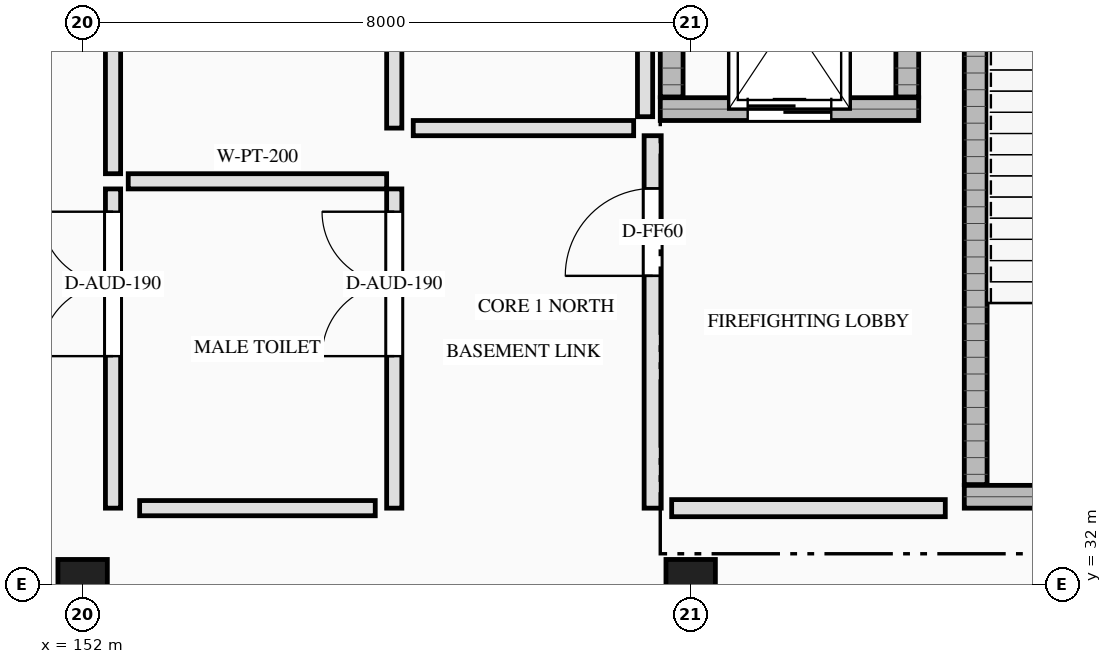
"""IFC4 building model, lengths in metres.
Left out: names, types, materials, properties, quantities, classifications, styles, units other than length and angle.
Written with IfcOpenShell. Run it as: python <this file> out.ifc"""

import sys

from ifc_helpers import new_model, si_unit, direction, frame, frame_2d, origin, origin_2d, place, context, subcontext, project, spatial, rectangle, extrude, element, fill, save


model = new_model("IFC4")
c1 = context("Model", 3, precision=1e-05, world=origin(), true_north=direction((0.0, 1.0)))
c2 = subcontext(c1, "Body", "Model", "MODEL_VIEW")
j1 = project(units=[si_unit("LENGTHUNIT", "METRE"), si_unit("PLANEANGLEUNIT", "RADIAN")], contexts=[c1])
p1 = place(None, origin())
s1 = spatial("IfcSite", under=j1, at=p1, CompositionType="ELEMENT")
p2 = place(p1, origin())
s2 = spatial("IfcBuilding", under=s1, at=p2, CompositionType="ELEMENT")
p3 = place(p2, frame((0.0, 0.0, -5.4)))
s3 = spatial("IfcBuildingStorey", under=s2, at=p3, CompositionType="ELEMENT", Elevation=-5.4)
p4 = place(p3, frame((163.6, 33.15, -0.4), z_axis=(0.0, 0.0, 1.0), x_axis=(1.0, 0.0, 0.0)))
e1 = element("IfcWall", 1, at=p4, inside=s3, PredefinedType="SHEAR", context=c2, shape_type="SweptSolid", body=[
    extrude(rectangle(XDim=4.4, YDim=0.3, at=frame_2d((2.2, 0.0))), origin(), (0.0, 0.0, 1.0), 5.8),
])
p5 = place(p4, frame((1.3, 0.0, 0.4)))
e2 = element("IfcOpeningElement", 2, at=p5, cuts=e1, PredefinedType="OPENING", context=c2, shape_type="SweptSolid", body=[
    extrude(rectangle(XDim=1.8, YDim=2.2, at=frame_2d((0.9, 1.1))), frame((0.0, 0.16, 0.0), z_axis=(0.0, -1.0, 0.0), x_axis=(1.0, 0.0, 0.0)), (0.0, 0.0, 1.0), 0.32),
])
p6 = place(p3, frame((163.75, 33.31, -0.4), z_axis=(0.0, 0.0, 1.0), x_axis=(0.0, 1.0, 0.0)))
e3 = element("IfcWall", 3, at=p6, inside=s3, PredefinedType="SHEAR", context=c2, shape_type="SweptSolid", body=[
    extrude(rectangle(XDim=9.38, YDim=0.3, at=frame_2d((4.69, 0.0))), origin(), (0.0, 0.0, 1.0), 5.8),
])
p7 = place(p3, frame((159.6, 38.25, -0.4), z_axis=(0.0, 0.0, 1.0), x_axis=(1.0, 0.0, 0.0)))
e4 = element("IfcWall", 4, at=p7, inside=s3, PredefinedType="SHEAR", context=c2, shape_type="SweptSolid", body=[
    extrude(rectangle(XDim=3.4, YDim=0.3, at=frame_2d((1.7, 0.0))), origin(), (0.0, 0.0, 1.0), 5.8),
])
p8 = place(p7, frame((1.15, 0.0, 0.4)))
e5 = element("IfcOpeningElement", 5, at=p8, cuts=e4, PredefinedType="OPENING", context=c2, shape_type="SweptSolid", body=[
    extrude(rectangle(XDim=1.1, YDim=2.15, at=frame_2d((0.55, 1.075))), frame((0.0, 0.16, 0.0), z_axis=(0.0, -1.0, 0.0), x_axis=(1.0, 0.0, 0.0)), (0.0, 0.0, 1.0), 0.32),
])
for number, where, z_axis, x_axis in (
    (6, (159.75, 38.41, -0.4), (0.0, 0.0, 1.0), (0.0, 1.0, 0.0)),
    (7, (162.85, 38.41, -0.4), (0.0, 0.0, 1.0), (0.0, 1.0, 0.0)),
):
    element("IfcWall", number, at=place(p3, frame(where, z_axis=z_axis, x_axis=x_axis)), inside=s3, PredefinedType="SHEAR", context=c2, shape_type="SweptSolid", body=[
        extrude(rectangle(XDim=2.08, YDim=0.3, at=frame_2d((1.04, 0.0))), origin(), (0.0, 0.0, 1.0), 5.8),
    ])
for number, where, z_axis, x_axis in (
    (8, (152.0, 32.0, -0.4), (0.0, 0.0, 1.0), (1.0, 0.0, 0.0)),
    (9, (160.0, 32.0, -0.4), (0.0, 0.0, 1.0), (1.0, 0.0, 0.0)),
):
    element("IfcColumn", number, at=place(p3, frame(where, z_axis=z_axis, x_axis=x_axis)), inside=s3, PredefinedType="COLUMN", context=c2, shape_type="SweptSolid", body=[
        extrude(rectangle(XDim=0.65, YDim=0.65, at=origin_2d()), origin(), (0.0, 0.0, 1.0), 5.8),
    ])
p9 = place(p3, frame((159.5, 33.0, 0.0), z_axis=(0.0, 0.0, 1.0), x_axis=(0.0, 1.0, 0.0)))
e10 = element("IfcWall", 10, at=p9, inside=s3, PredefinedType="SOLIDWALL", context=c2, shape_type="SweptSolid", body=[
    extrude(rectangle(XDim=4.9, YDim=0.225, at=frame_2d((2.45, 0.0))), origin(), (0.0, 0.0, 1.0), 5.12),
])
p10 = place(p9, frame((3.056, 0.0, 0.0)))
e11 = element("IfcOpeningElement", 11, at=p10, cuts=e10, PredefinedType="OPENING", context=c2, shape_type="SweptSolid", body=[
    extrude(rectangle(XDim=1.15, YDim=2.2, at=frame_2d((0.575, 1.1))), frame((0.0, 0.123, 0.0), z_axis=(0.0, -1.0, 0.0), x_axis=(1.0, 0.0, 0.0)), (0.0, 0.0, 1.0), 0.245),
])
p11 = place(p3, frame((152.6, 37.3, 0.0), z_axis=(0.0, 0.0, 1.0), x_axis=(1.0, 0.0, 0.0)))
e12 = element("IfcWall", 12, at=p11, inside=s3, PredefinedType="PARTITIONING", context=c2, shape_type="SweptSolid", body=[
    extrude(rectangle(XDim=3.4, YDim=0.2, at=frame_2d((1.7, 0.0))), origin(), (0.0, 0.0, 1.0), 5.12),
])
p12 = place(p3, frame((152.4, 33.0, 0.0), z_axis=(0.0, 0.0, 1.0), x_axis=(0.0, 1.0, 0.0)))
e13 = element("IfcWall", 13, at=p12, inside=s3, PredefinedType="PARTITIONING", context=c2, shape_type="SweptSolid", body=[
    extrude(rectangle(XDim=4.2, YDim=0.2, at=frame_2d((2.1, 0.0))), origin(), (0.0, 0.0, 1.0), 5.12),
])
p13 = place(p12, frame((2.0, 0.0, 0.0)))
e14 = element("IfcOpeningElement", 14, at=p13, cuts=e13, PredefinedType="OPENING", context=c2, shape_type="SweptSolid", body=[
    extrude(rectangle(XDim=1.9, YDim=2.35, at=frame_2d((0.95, 1.175))), frame((0.0, 0.11, 0.0), z_axis=(0.0, -1.0, 0.0), x_axis=(1.0, 0.0, 0.0)), (0.0, 0.0, 1.0), 0.22),
])
p14 = place(p3, frame((156.1, 33.0, 0.0), z_axis=(0.0, 0.0, 1.0), x_axis=(0.0, 1.0, 0.0)))
e15 = element("IfcWall", 15, at=p14, inside=s3, PredefinedType="PARTITIONING", context=c2, shape_type="SweptSolid", body=[
    extrude(rectangle(XDim=4.2, YDim=0.2, at=frame_2d((2.1, 0.0))), origin(), (0.0, 0.0, 1.0), 5.12),
])
p15 = place(p14, frame((2.0, 0.0, 0.0)))
e16 = element("IfcOpeningElement", 16, at=p15, cuts=e15, PredefinedType="OPENING", context=c2, shape_type="SweptSolid", body=[
    extrude(rectangle(XDim=1.9, YDim=2.35, at=frame_2d((0.95, 1.175))), frame((0.0, 0.11, 0.0), z_axis=(0.0, -1.0, 0.0), x_axis=(1.0, 0.0, 0.0)), (0.0, 0.0, 1.0), 0.22),
])
p16 = place(p3, frame((156.1, 38.0, 0.0), z_axis=(0.0, 0.0, 1.0), x_axis=(0.0, 1.0, 0.0)))
e17 = element("IfcWall", 17, at=p16, inside=s3, PredefinedType="PARTITIONING", context=c2, shape_type="SweptSolid", body=[
    extrude(rectangle(XDim=3.6, YDim=0.2, at=frame_2d((1.8, 0.0))), origin(), (0.0, 0.0, 1.0), 5.12),
])
p17 = place(p3, frame((152.4, 37.4, 0.0), z_axis=(0.0, 0.0, 1.0), x_axis=(0.0, 1.0, 0.0)))
e18 = element("IfcWall", 18, at=p17, inside=s3, PredefinedType="PARTITIONING", context=c2, shape_type="SweptSolid", body=[
    extrude(rectangle(XDim=4.2, YDim=0.2, at=frame_2d((2.1, 0.0))), origin(), (0.0, 0.0, 1.0), 5.12),
])
p18 = place(p3, frame((159.75, 33.0, 0.0), z_axis=(0.0, 0.0, 1.0), x_axis=(1.0, 0.0, 0.0)))
e19 = element("IfcWall", 19, at=p18, inside=s3, PredefinedType="SOLIDWALL", context=c2, shape_type="SweptSolid", body=[
    extrude(rectangle(XDim=3.6, YDim=0.225, at=frame_2d((1.8, 0.0))), origin(), (0.0, 0.0, 1.0), 5.12),
])
p19 = place(p3, frame((152.75, 33.0, 0.0), z_axis=(0.0, 0.0, 1.0), x_axis=(1.0, 0.0, 0.0)))
e20 = element("IfcWall", 20, at=p19, inside=s3, PredefinedType="PARTITIONING", context=c2, shape_type="SweptSolid", body=[
    extrude(rectangle(XDim=3.1, YDim=0.2, at=frame_2d((1.55, 0.0))), origin(), (0.0, 0.0, 1.0), 5.12),
])
p20 = place(p3, frame((156.35, 38.0, 0.0), z_axis=(0.0, 0.0, 1.0), x_axis=(1.0, 0.0, 0.0)))
e21 = element("IfcWall", 21, at=p20, inside=s3, PredefinedType="PARTITIONING", context=c2, shape_type="SweptSolid", body=[
    extrude(rectangle(XDim=2.9, YDim=0.2, at=frame_2d((1.45, 0.0))), origin(), (0.0, 0.0, 1.0), 5.12),
])
p21 = place(p3, frame((159.4, 38.15, 0.0), z_axis=(0.0, 0.0, 1.0), x_axis=(0.0, 1.0, 0.0)))
e22 = element("IfcWall", 22, at=p21, inside=s3, PredefinedType="PARTITIONING", context=c2, shape_type="SweptSolid", body=[
    extrude(rectangle(XDim=3.3, YDim=0.2, at=frame_2d((1.65, 0.0))), origin(), (0.0, 0.0, 1.0), 5.12),
])
p22 = place(p8, origin())
e23 = element("IfcDoor", 23, at=p22, inside=s3, OperationType="SLIDING_TO_LEFT", PredefinedType="DOOR", context=c2, shape_type="SweptSolid", body=[
    extrude(rectangle(XDim=1.1, YDim=2.15, at=frame_2d((0.55, 1.075))), frame((0.0, 0.025, 0.0), z_axis=(0.0, -1.0, 0.0), x_axis=(1.0, 0.0, 0.0)), (0.0, 0.0, 1.0), 0.05),
])
fill(e5, e23)
p23 = place(p10, origin())
e24 = element("IfcDoor", 24, at=p23, inside=s3, OperationType="SINGLE_SWING_LEFT", PredefinedType="DOOR", context=c2, shape_type="SweptSolid", body=[
    extrude(rectangle(XDim=1.15, YDim=2.2, at=frame_2d((0.575, 1.1))), frame((0.0, 0.025, 0.0), z_axis=(0.0, -1.0, 0.0), x_axis=(1.0, 0.0, 0.0)), (0.0, 0.0, 1.0), 0.05),
])
fill(e11, e24)
p24 = place(p13, origin())
e25 = element("IfcDoor", 25, at=p24, inside=s3, OperationType="DOUBLE_DOOR_SINGLE_SWING", PredefinedType="DOOR", context=c2, shape_type="SweptSolid", body=[
    extrude(rectangle(XDim=1.9, YDim=2.35, at=frame_2d((0.95, 1.175))), frame((0.0, 0.025, 0.0), z_axis=(0.0, -1.0, 0.0), x_axis=(1.0, 0.0, 0.0)), (0.0, 0.0, 1.0), 0.05),
])
fill(e14, e25)
p25 = place(p15, origin())
e26 = element("IfcDoor", 26, at=p25, inside=s3, OperationType="DOUBLE_DOOR_SINGLE_SWING", PredefinedType="DOOR", context=c2, shape_type="SweptSolid", body=[
    extrude(rectangle(XDim=1.9, YDim=2.35, at=frame_2d((0.95, 1.175))), frame((0.0, 0.025, 0.0), z_axis=(0.0, -1.0, 0.0), x_axis=(1.0, 0.0, 0.0)), (0.0, 0.0, 1.0), 0.05),
])
fill(e16, e26)
save(model, sys.argv[1])
